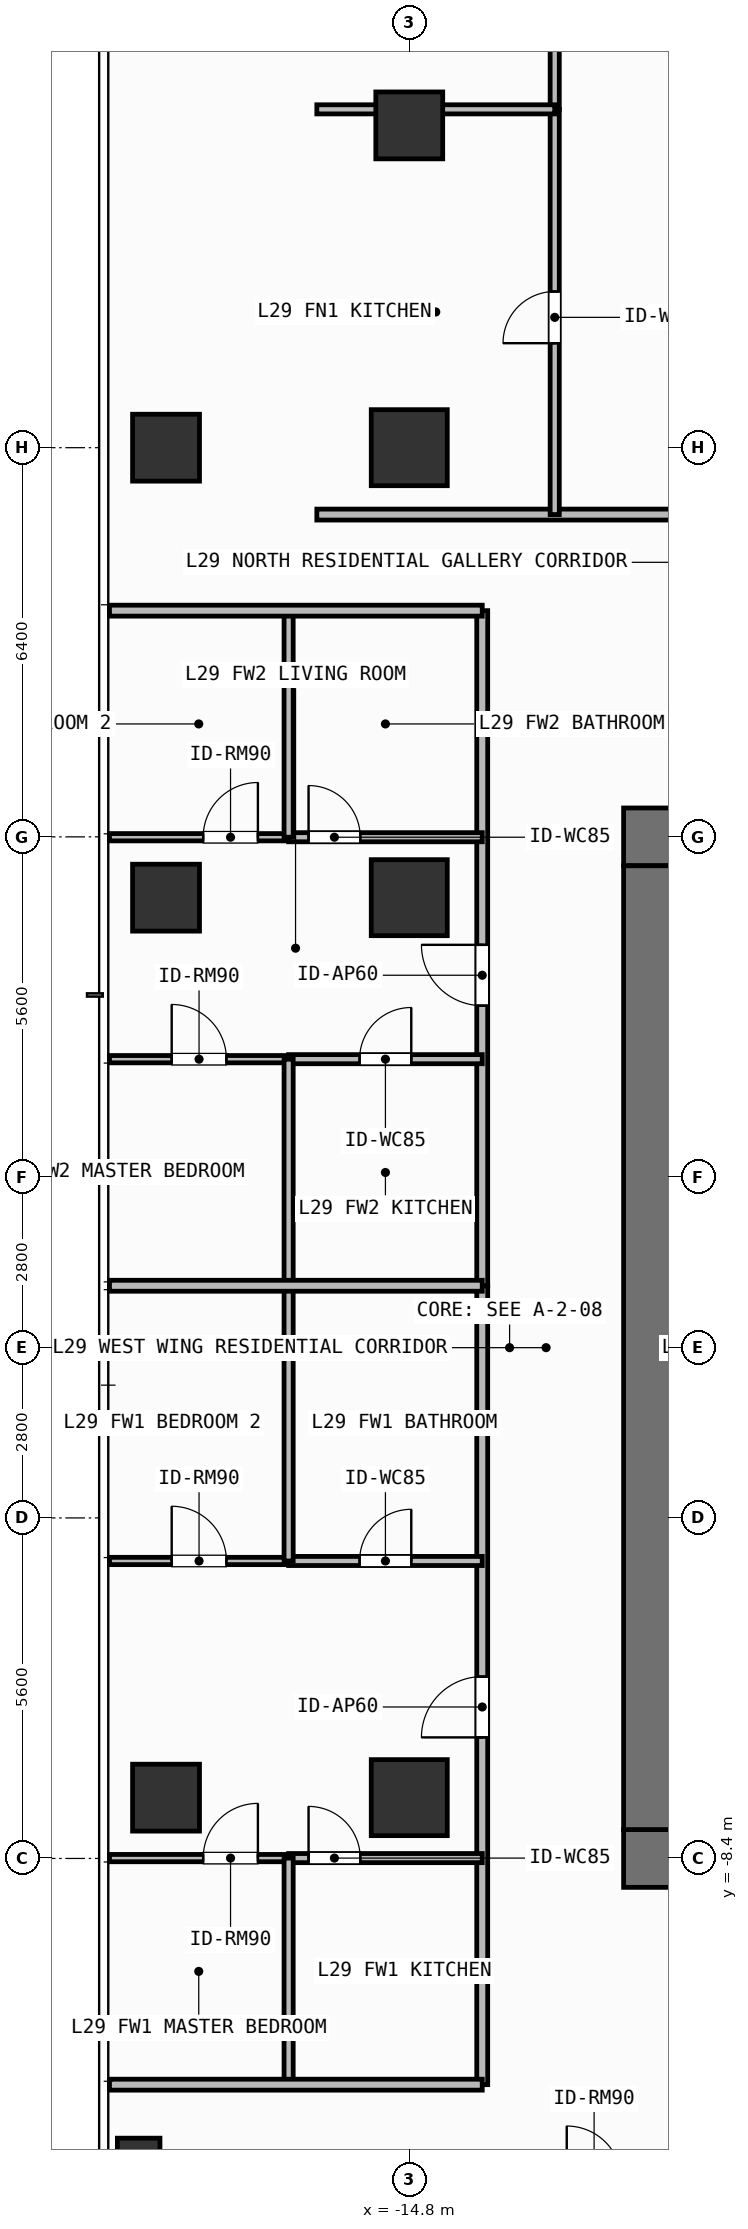
"""IFC4 building model, lengths in metres.
Left out: names, types, materials, properties, quantities, classifications, styles, units other than length and angle.
Written with IfcOpenShell. Run it as: python <this file> out.ifc"""

import sys

from ifc_helpers import new_model, si_unit, direction, frame, frame_2d, origin, origin_2d, place, context, subcontext, project, spatial, rectangle, hollow_rectangle, extrude, element, fill, save


model = new_model("IFC4")
c1 = context("Model", 3, precision=1e-05, world=origin(), true_north=direction((0.0, 1.0)))
c2 = subcontext(c1, "Body", "Model", "MODEL_VIEW")
j1 = project(units=[si_unit("LENGTHUNIT", "METRE"), si_unit("PLANEANGLEUNIT", "RADIAN")], contexts=[c1])
p1 = place(None, origin())
s1 = spatial("IfcSite", under=j1, at=p1, CompositionType="ELEMENT")
p2 = place(p1, origin())
s2 = spatial("IfcBuilding", under=s1, at=p2, CompositionType="ELEMENT")
p3 = place(p2, frame((0.0, 0.0, 117.3)))
s3 = spatial("IfcBuildingStorey", under=s2, at=p3, CompositionType="ELEMENT", Elevation=117.3)
for number, where, z_axis, x_axis in (
    (1, (-11.275, -8.4, 0.0), (0.0, 0.0, 1.0), (1.0, 0.0, 0.0)),
    (2, (-11.275, 8.4, 0.0), (0.0, 0.0, 1.0), (1.0, 0.0, 0.0)),
):
    element("IfcWall", number, at=place(p3, frame(where, z_axis=z_axis, x_axis=x_axis)), inside=s3, PredefinedType="SHEAR", context=c2, shape_type="SweptSolid", body=[
        extrude(rectangle(XDim=1.575, YDim=0.95, at=frame_2d((0.788, 0.0))), origin(), (0.0, 0.0, 1.0), 3.9),
    ])
p4 = place(p3, frame((-10.8, -7.925, 0.0), z_axis=(0.0, 0.0, 1.0), x_axis=(0.0, 1.0, 0.0)))
e3 = element("IfcWall", 3, at=p4, inside=s3, PredefinedType="SHEAR", context=c2, shape_type="SweptSolid", body=[
    extrude(rectangle(XDim=15.85, YDim=0.95, at=frame_2d((7.925, 0.0))), origin(), (0.0, 0.0, 1.0), 3.9),
])
for number, where, z_axis, x_axis in (
    (4, (-14.8, 14.8, 0.0), (0.0, 0.0, 1.0), (1.0, 0.0, 0.0)),
    (5, (-14.8, -7.4, 0.0), (0.0, 0.0, 1.0), (1.0, 0.0, 0.0)),
    (6, (-14.8, 7.4, 0.0), (0.0, 0.0, 1.0), (1.0, 0.0, 0.0)),
):
    element("IfcColumn", number, at=place(p3, frame(where, z_axis=z_axis, x_axis=x_axis)), inside=s3, PredefinedType="COLUMN", context=c2, shape_type="SweptSolid", body=[
        extrude(rectangle(XDim=1.25, YDim=1.25, at=origin_2d()), origin(), (0.0, 0.0, 1.0), 3.9),
    ])
for number, where, z_axis, x_axis in (
    (7, (-18.8, -7.4, 0.0), (0.0, 0.0, 1.0), (1.0, 0.0, 0.0)),
    (8, (-18.8, 7.4, 0.0), (0.0, 0.0, 1.0), (1.0, 0.0, 0.0)),
    (9, (-18.8, 14.8, 0.0), (0.0, 0.0, 1.0), (1.0, 0.0, 0.0)),
    (10, (-14.8, 20.1, 0.0), (0.0, 0.0, 1.0), (1.0, 0.0, 0.0)),
):
    element("IfcColumn", number, at=place(p3, frame(where, z_axis=z_axis, x_axis=x_axis)), inside=s3, PredefinedType="COLUMN", context=c2, shape_type="SweptSolid", body=[
        extrude(rectangle(XDim=1.1, YDim=1.1, at=origin_2d()), origin(), (0.0, 0.0, 1.0), 3.9),
    ])
p5 = place(p3, frame((-19.25, -13.35, 0.0), z_axis=(0.0, 0.0, 1.0), x_axis=(1.0, 0.0, 0.0)))
e11 = element("IfcColumn", 11, at=p5, inside=s3, PredefinedType="COLUMN", context=c2, shape_type="SweptSolid", body=[
    extrude(hollow_rectangle(XDim=0.7, YDim=0.7, WallThickness=0.032, at=origin_2d()), origin(), (0.0, 0.0, 1.0), 3.9),
])
p6 = place(p3, frame((-16.32, 13.7, 0.0), z_axis=(0.0, 0.0, 1.0), x_axis=(1.0, 0.0, 0.0)))
e12 = element("IfcWall", 12, at=p6, inside=s3, PredefinedType="PARTITIONING", context=c2, shape_type="SweptSolid", body=[
    extrude(rectangle(XDim=12.941, YDim=0.18, at=frame_2d((6.471, 0.0))), origin(), (0.0, 0.0, 1.0), 3.68),
])
p7 = place(p6, frame((6.417, 0.0, 0.0)))
e13 = element("IfcOpeningElement", 13, at=p7, cuts=e12, PredefinedType="OPENING", context=c2, shape_type="SweptSolid", body=[
    extrude(rectangle(XDim=1.0, YDim=2.2, at=frame_2d((0.5, 1.1))), frame((0.0, 0.1, 0.0), z_axis=(0.0, -1.0, 0.0), x_axis=(1.0, 0.0, 0.0)), (0.0, 0.0, 1.0), 0.2),
])
p8 = place(p3, frame((-12.408, 13.7, 0.0), z_axis=(0.0, 0.0, 1.0), x_axis=(0.0, 1.0, 0.0)))
e14 = element("IfcWall", 14, at=p8, inside=s3, PredefinedType="PARTITIONING", context=c2, shape_type="SweptSolid", body=[
    extrude(rectangle(XDim=6.664, YDim=0.15, at=frame_2d((3.332, 0.0))), origin(), (0.0, 0.0, 1.0), 3.68),
])
p9 = place(p8, frame((2.818, 0.0, 0.0)))
e15 = element("IfcOpeningElement", 15, at=p9, cuts=e14, PredefinedType="OPENING", context=c2, shape_type="SweptSolid", body=[
    extrude(rectangle(XDim=0.85, YDim=2.1, at=frame_2d((0.425, 1.05))), frame((0.0, 0.085, 0.0), z_axis=(0.0, -1.0, 0.0), x_axis=(1.0, 0.0, 0.0)), (0.0, 0.0, 1.0), 0.17),
])
p10 = place(p3, frame((-12.408, 20.364, 0.0), z_axis=(0.0, 0.0, 1.0), x_axis=(0.0, 1.0, 0.0)))
e16 = element("IfcWall", 16, at=p10, inside=s3, PredefinedType="PARTITIONING", context=c2, shape_type="SweptSolid", body=[
    extrude(rectangle(XDim=4.826, YDim=0.15, at=frame_2d((2.413, 0.0))), origin(), (0.0, 0.0, 1.0), 3.68),
])
p11 = place(p10, frame((1.901, 0.0, 0.0)))
e17 = element("IfcOpeningElement", 17, at=p11, cuts=e16, PredefinedType="OPENING", context=c2, shape_type="SweptSolid", body=[
    extrude(rectangle(XDim=0.85, YDim=2.1, at=frame_2d((0.425, 1.05))), frame((0.0, 0.085, 0.0), z_axis=(0.0, -1.0, 0.0), x_axis=(1.0, 0.0, 0.0)), (0.0, 0.0, 1.0), 0.17),
])
p12 = place(p3, frame((-13.6, -12.12, 0.0), z_axis=(0.0, 0.0, 1.0), x_axis=(0.0, 1.0, 0.0)))
e18 = element("IfcWall", 18, at=p12, inside=s3, PredefinedType="PARTITIONING", context=c2, shape_type="SweptSolid", body=[
    extrude(rectangle(XDim=13.138, YDim=0.18, at=frame_2d((6.569, 0.0))), origin(), (0.0, 0.0, 1.0), 3.68),
])
p13 = place(p12, frame((5.711, 0.0, 0.0)))
e19 = element("IfcOpeningElement", 19, at=p13, cuts=e18, PredefinedType="OPENING", context=c2, shape_type="SweptSolid", body=[
    extrude(rectangle(XDim=1.0, YDim=2.2, at=frame_2d((0.5, 1.1))), frame((0.0, 0.1, 0.0), z_axis=(0.0, -1.0, 0.0), x_axis=(1.0, 0.0, 0.0)), (0.0, 0.0, 1.0), 0.2),
])
p14 = place(p3, frame((-16.784, -3.508, 0.0), z_axis=(0.0, 0.0, 1.0), x_axis=(1.0, 0.0, 0.0)))
e20 = element("IfcWall", 20, at=p14, inside=s3, PredefinedType="PARTITIONING", context=c2, shape_type="SweptSolid", body=[
    extrude(rectangle(XDim=3.184, YDim=0.15, at=frame_2d((1.592, 0.0))), origin(), (0.0, 0.0, 1.0), 3.68),
])
p15 = place(p14, frame((1.167, 0.0, 0.0)))
e21 = element("IfcOpeningElement", 21, at=p15, cuts=e20, PredefinedType="OPENING", context=c2, shape_type="SweptSolid", body=[
    extrude(rectangle(XDim=0.85, YDim=2.1, at=frame_2d((0.425, 1.05))), frame((0.0, 0.085, 0.0), z_axis=(0.0, -1.0, 0.0), x_axis=(1.0, 0.0, 0.0)), (0.0, 0.0, 1.0), 0.17),
])
p16 = place(p3, frame((-16.784, -8.394, 0.0), z_axis=(0.0, 0.0, 1.0), x_axis=(1.0, 0.0, 0.0)))
e22 = element("IfcWall", 22, at=p16, inside=s3, PredefinedType="PARTITIONING", context=c2, shape_type="SweptSolid", body=[
    extrude(rectangle(XDim=3.184, YDim=0.15, at=frame_2d((1.592, 0.0))), origin(), (0.0, 0.0, 1.0), 3.68),
])
p17 = place(p16, frame((0.328, 0.0, 0.0)))
e23 = element("IfcOpeningElement", 23, at=p17, cuts=e22, PredefinedType="OPENING", context=c2, shape_type="SweptSolid", body=[
    extrude(rectangle(XDim=0.85, YDim=2.1, at=frame_2d((0.425, 1.05))), frame((0.0, 0.085, 0.0), z_axis=(0.0, -1.0, 0.0), x_axis=(1.0, 0.0, 0.0)), (0.0, 0.0, 1.0), 0.17),
])
p18 = place(p3, frame((-19.73, -8.394, 0.0), z_axis=(0.0, 0.0, 1.0), x_axis=(1.0, 0.0, 0.0)))
e24 = element("IfcWall", 24, at=p18, inside=s3, PredefinedType="PARTITIONING", context=c2, shape_type="SweptSolid", body=[
    extrude(rectangle(XDim=2.946, YDim=0.12, at=frame_2d((1.473, 0.0))), origin(), (0.0, 0.0, 1.0), 3.68),
])
p19 = place(p18, frame((1.541, 0.0, 0.0)))
e25 = element("IfcOpeningElement", 25, at=p19, cuts=e24, PredefinedType="OPENING", context=c2, shape_type="SweptSolid", body=[
    extrude(rectangle(XDim=0.9, YDim=2.1, at=frame_2d((0.45, 1.05))), frame((0.0, 0.07, 0.0), z_axis=(0.0, -1.0, 0.0), x_axis=(1.0, 0.0, 0.0)), (0.0, 0.0, 1.0), 0.14),
])
p20 = place(p3, frame((-19.73, -3.508, 0.0), z_axis=(0.0, 0.0, 1.0), x_axis=(1.0, 0.0, 0.0)))
e26 = element("IfcWall", 26, at=p20, inside=s3, PredefinedType="PARTITIONING", context=c2, shape_type="SweptSolid", body=[
    extrude(rectangle(XDim=2.946, YDim=0.12, at=frame_2d((1.473, 0.0))), origin(), (0.0, 0.0, 1.0), 3.68),
])
p21 = place(p20, frame((1.023, 0.0, 0.0)))
e27 = element("IfcOpeningElement", 27, at=p21, cuts=e26, PredefinedType="OPENING", context=c2, shape_type="SweptSolid", body=[
    extrude(rectangle(XDim=0.9, YDim=2.1, at=frame_2d((0.45, 1.05))), frame((0.0, 0.07, 0.0), z_axis=(0.0, -1.0, 0.0), x_axis=(1.0, 0.0, 0.0)), (0.0, 0.0, 1.0), 0.14),
])
p22 = place(p3, frame((-13.6, 1.018, 0.0), z_axis=(0.0, 0.0, 1.0), x_axis=(0.0, 1.0, 0.0)))
e28 = element("IfcWall", 28, at=p22, inside=s3, PredefinedType="PARTITIONING", context=c2, shape_type="SweptSolid", body=[
    extrude(rectangle(XDim=11.102, YDim=0.18, at=frame_2d((5.551, 0.0))), origin(), (0.0, 0.0, 1.0), 3.68),
])
p23 = place(p22, frame((4.606, 0.0, 0.0)))
e29 = element("IfcOpeningElement", 29, at=p23, cuts=e28, PredefinedType="OPENING", context=c2, shape_type="SweptSolid", body=[
    extrude(rectangle(XDim=1.0, YDim=2.2, at=frame_2d((0.5, 1.1))), frame((0.0, 0.1, 0.0), z_axis=(0.0, -1.0, 0.0), x_axis=(1.0, 0.0, 0.0)), (0.0, 0.0, 1.0), 0.2),
])
p24 = place(p3, frame((-16.784, 8.394, 0.0), z_axis=(0.0, 0.0, 1.0), x_axis=(1.0, 0.0, 0.0)))
e30 = element("IfcWall", 30, at=p24, inside=s3, PredefinedType="PARTITIONING", context=c2, shape_type="SweptSolid", body=[
    extrude(rectangle(XDim=3.184, YDim=0.15, at=frame_2d((1.592, 0.0))), origin(), (0.0, 0.0, 1.0), 3.68),
])
p25 = place(p24, frame((0.328, 0.0, 0.0)))
e31 = element("IfcOpeningElement", 31, at=p25, cuts=e30, PredefinedType="OPENING", context=c2, shape_type="SweptSolid", body=[
    extrude(rectangle(XDim=0.85, YDim=2.1, at=frame_2d((0.425, 1.05))), frame((0.0, 0.085, 0.0), z_axis=(0.0, -1.0, 0.0), x_axis=(1.0, 0.0, 0.0)), (0.0, 0.0, 1.0), 0.17),
])
p26 = place(p3, frame((-16.784, 4.744, 0.0), z_axis=(0.0, 0.0, 1.0), x_axis=(1.0, 0.0, 0.0)))
e32 = element("IfcWall", 32, at=p26, inside=s3, PredefinedType="PARTITIONING", context=c2, shape_type="SweptSolid", body=[
    extrude(rectangle(XDim=3.184, YDim=0.15, at=frame_2d((1.592, 0.0))), origin(), (0.0, 0.0, 1.0), 3.68),
])
p27 = place(p26, frame((1.167, 0.0, 0.0)))
e33 = element("IfcOpeningElement", 33, at=p27, cuts=e32, PredefinedType="OPENING", context=c2, shape_type="SweptSolid", body=[
    extrude(rectangle(XDim=0.85, YDim=2.1, at=frame_2d((0.425, 1.05))), frame((0.0, 0.085, 0.0), z_axis=(0.0, -1.0, 0.0), x_axis=(1.0, 0.0, 0.0)), (0.0, 0.0, 1.0), 0.17),
])
p28 = place(p3, frame((-19.73, 4.744, 0.0), z_axis=(0.0, 0.0, 1.0), x_axis=(1.0, 0.0, 0.0)))
e34 = element("IfcWall", 34, at=p28, inside=s3, PredefinedType="PARTITIONING", context=c2, shape_type="SweptSolid", body=[
    extrude(rectangle(XDim=2.946, YDim=0.12, at=frame_2d((1.473, 0.0))), origin(), (0.0, 0.0, 1.0), 3.68),
])
p29 = place(p28, frame((1.023, 0.0, 0.0)))
e35 = element("IfcOpeningElement", 35, at=p29, cuts=e34, PredefinedType="OPENING", context=c2, shape_type="SweptSolid", body=[
    extrude(rectangle(XDim=0.9, YDim=2.1, at=frame_2d((0.45, 1.05))), frame((0.0, 0.07, 0.0), z_axis=(0.0, -1.0, 0.0), x_axis=(1.0, 0.0, 0.0)), (0.0, 0.0, 1.0), 0.14),
])
p30 = place(p3, frame((-19.73, 8.394, 0.0), z_axis=(0.0, 0.0, 1.0), x_axis=(1.0, 0.0, 0.0)))
e36 = element("IfcWall", 36, at=p30, inside=s3, PredefinedType="PARTITIONING", context=c2, shape_type="SweptSolid", body=[
    extrude(rectangle(XDim=2.946, YDim=0.12, at=frame_2d((1.473, 0.0))), origin(), (0.0, 0.0, 1.0), 3.68),
])
p31 = place(p30, frame((1.541, 0.0, 0.0)))
e37 = element("IfcOpeningElement", 37, at=p31, cuts=e36, PredefinedType="OPENING", context=c2, shape_type="SweptSolid", body=[
    extrude(rectangle(XDim=0.9, YDim=2.1, at=frame_2d((0.45, 1.05))), frame((0.0, 0.07, 0.0), z_axis=(0.0, -1.0, 0.0), x_axis=(1.0, 0.0, 0.0)), (0.0, 0.0, 1.0), 0.14),
])
p32 = place(p3, frame((-16.32, 20.364, 0.0), z_axis=(0.0, 0.0, 1.0), x_axis=(1.0, 0.0, 0.0)))
e38 = element("IfcWall", 38, at=p32, inside=s3, PredefinedType="PARTITIONING", context=c2, shape_type="SweptSolid", body=[
    extrude(rectangle(XDim=3.912, YDim=0.15, at=frame_2d((1.956, 0.0))), origin(), (0.0, 0.0, 1.0), 3.082),
])
p33 = place(p3, frame((-16.784, -12.12, 0.0), z_axis=(0.0, 0.0, 1.0), x_axis=(0.0, 1.0, 0.0)))
e39 = element("IfcWall", 39, at=p33, inside=s3, PredefinedType="PARTITIONING", context=c2, shape_type="SweptSolid", body=[
    extrude(rectangle(XDim=3.726, YDim=0.15, at=frame_2d((1.863, 0.0))), origin(), (0.0, 0.0, 1.0), 3.68),
])
p34 = place(p3, frame((-16.784, -3.508, 0.0), z_axis=(0.0, 0.0, 1.0), x_axis=(0.0, 1.0, 0.0)))
e40 = element("IfcWall", 40, at=p34, inside=s3, PredefinedType="PARTITIONING", context=c2, shape_type="SweptSolid", body=[
    extrude(rectangle(XDim=4.526, YDim=0.15, at=frame_2d((2.263, 0.0))), origin(), (0.0, 0.0, 1.0), 3.68),
])
p35 = place(p3, frame((-16.784, 1.018, 0.0), z_axis=(0.0, 0.0, 1.0), x_axis=(0.0, 1.0, 0.0)))
e41 = element("IfcWall", 41, at=p35, inside=s3, PredefinedType="PARTITIONING", context=c2, shape_type="SweptSolid", body=[
    extrude(rectangle(XDim=3.726, YDim=0.15, at=frame_2d((1.863, 0.0))), origin(), (0.0, 0.0, 1.0), 3.68),
])
p36 = place(p3, frame((-16.784, 8.394, 0.0), z_axis=(0.0, 0.0, 1.0), x_axis=(0.0, 1.0, 0.0)))
e42 = element("IfcWall", 42, at=p36, inside=s3, PredefinedType="PARTITIONING", context=c2, shape_type="SweptSolid", body=[
    extrude(rectangle(XDim=3.726, YDim=0.15, at=frame_2d((1.863, 0.0))), origin(), (0.0, 0.0, 1.0), 3.68),
])
for number, where, z_axis, x_axis in (
    (43, (-19.73, 1.018, 0.0), (0.0, 0.0, 1.0), (1.0, 0.0, 0.0)),
    (44, (-19.73, -12.12, 0.0), (0.0, 0.0, 1.0), (1.0, 0.0, 0.0)),
    (45, (-19.73, 12.12, 0.0), (0.0, 0.0, 1.0), (1.0, 0.0, 0.0)),
):
    element("IfcWall", number, at=place(p3, frame(where, z_axis=z_axis, x_axis=x_axis)), inside=s3, PredefinedType="PARTITIONING", context=c2, shape_type="SweptSolid", body=[
        extrude(rectangle(XDim=6.13, YDim=0.18, at=frame_2d((3.065, 0.0))), origin(), (0.0, 0.0, 1.0), 3.68),
    ])
p37 = place(p9, origin())
e46 = element("IfcDoor", 46, at=p37, inside=s3, OperationType="SINGLE_SWING_LEFT", PredefinedType="DOOR", context=c2, shape_type="SweptSolid", body=[
    extrude(rectangle(XDim=0.85, YDim=2.1, at=frame_2d((0.425, 1.05))), frame((0.0, 0.025, 0.0), z_axis=(0.0, -1.0, 0.0), x_axis=(1.0, 0.0, 0.0)), (0.0, 0.0, 1.0), 0.05),
])
fill(e15, e46)
p38 = place(p13, origin())
e47 = element("IfcDoor", 47, at=p38, inside=s3, OperationType="SINGLE_SWING_LEFT", PredefinedType="DOOR", context=c2, shape_type="SweptSolid", body=[
    extrude(rectangle(XDim=1.0, YDim=2.2, at=frame_2d((0.5, 1.1))), frame((0.0, 0.025, 0.0), z_axis=(0.0, -1.0, 0.0), x_axis=(1.0, 0.0, 0.0)), (0.0, 0.0, 1.0), 0.05),
])
fill(e19, e47)
p39 = place(p15, origin())
e48 = element("IfcDoor", 48, at=p39, inside=s3, OperationType="SINGLE_SWING_RIGHT", PredefinedType="DOOR", context=c2, shape_type="SweptSolid", body=[
    extrude(rectangle(XDim=0.85, YDim=2.1, at=frame_2d((0.425, 1.05))), frame((0.0, 0.025, 0.0), z_axis=(0.0, -1.0, 0.0), x_axis=(1.0, 0.0, 0.0)), (0.0, 0.0, 1.0), 0.05),
])
fill(e21, e48)
p40 = place(p17, origin())
e49 = element("IfcDoor", 49, at=p40, inside=s3, OperationType="SINGLE_SWING_LEFT", PredefinedType="DOOR", context=c2, shape_type="SweptSolid", body=[
    extrude(rectangle(XDim=0.85, YDim=2.1, at=frame_2d((0.425, 1.05))), frame((0.0, 0.025, 0.0), z_axis=(0.0, -1.0, 0.0), x_axis=(1.0, 0.0, 0.0)), (0.0, 0.0, 1.0), 0.05),
])
fill(e23, e49)
p41 = place(p19, origin())
e50 = element("IfcDoor", 50, at=p41, inside=s3, OperationType="SINGLE_SWING_RIGHT", PredefinedType="DOOR", context=c2, shape_type="SweptSolid", body=[
    extrude(rectangle(XDim=0.9, YDim=2.1, at=frame_2d((0.45, 1.05))), frame((0.0, 0.025, 0.0), z_axis=(0.0, -1.0, 0.0), x_axis=(1.0, 0.0, 0.0)), (0.0, 0.0, 1.0), 0.05),
])
fill(e25, e50)
p42 = place(p21, origin())
e51 = element("IfcDoor", 51, at=p42, inside=s3, OperationType="SINGLE_SWING_LEFT", PredefinedType="DOOR", context=c2, shape_type="SweptSolid", body=[
    extrude(rectangle(XDim=0.9, YDim=2.1, at=frame_2d((0.45, 1.05))), frame((0.0, 0.025, 0.0), z_axis=(0.0, -1.0, 0.0), x_axis=(1.0, 0.0, 0.0)), (0.0, 0.0, 1.0), 0.05),
])
fill(e27, e51)
p43 = place(p23, origin())
e52 = element("IfcDoor", 52, at=p43, inside=s3, OperationType="SINGLE_SWING_RIGHT", PredefinedType="DOOR", context=c2, shape_type="SweptSolid", body=[
    extrude(rectangle(XDim=1.0, YDim=2.2, at=frame_2d((0.5, 1.1))), frame((0.0, 0.025, 0.0), z_axis=(0.0, -1.0, 0.0), x_axis=(1.0, 0.0, 0.0)), (0.0, 0.0, 1.0), 0.05),
])
fill(e29, e52)
p44 = place(p25, origin())
e53 = element("IfcDoor", 53, at=p44, inside=s3, OperationType="SINGLE_SWING_LEFT", PredefinedType="DOOR", context=c2, shape_type="SweptSolid", body=[
    extrude(rectangle(XDim=0.85, YDim=2.1, at=frame_2d((0.425, 1.05))), frame((0.0, 0.025, 0.0), z_axis=(0.0, -1.0, 0.0), x_axis=(1.0, 0.0, 0.0)), (0.0, 0.0, 1.0), 0.05),
])
fill(e31, e53)
p45 = place(p27, origin())
e54 = element("IfcDoor", 54, at=p45, inside=s3, OperationType="SINGLE_SWING_RIGHT", PredefinedType="DOOR", context=c2, shape_type="SweptSolid", body=[
    extrude(rectangle(XDim=0.85, YDim=2.1, at=frame_2d((0.425, 1.05))), frame((0.0, 0.025, 0.0), z_axis=(0.0, -1.0, 0.0), x_axis=(1.0, 0.0, 0.0)), (0.0, 0.0, 1.0), 0.05),
])
fill(e33, e54)
p46 = place(p29, origin())
e55 = element("IfcDoor", 55, at=p46, inside=s3, OperationType="SINGLE_SWING_LEFT", PredefinedType="DOOR", context=c2, shape_type="SweptSolid", body=[
    extrude(rectangle(XDim=0.9, YDim=2.1, at=frame_2d((0.45, 1.05))), frame((0.0, 0.025, 0.0), z_axis=(0.0, -1.0, 0.0), x_axis=(1.0, 0.0, 0.0)), (0.0, 0.0, 1.0), 0.05),
])
fill(e35, e55)
p47 = place(p31, origin())
e56 = element("IfcDoor", 56, at=p47, inside=s3, OperationType="SINGLE_SWING_RIGHT", PredefinedType="DOOR", context=c2, shape_type="SweptSolid", body=[
    extrude(rectangle(XDim=0.9, YDim=2.1, at=frame_2d((0.45, 1.05))), frame((0.0, 0.025, 0.0), z_axis=(0.0, -1.0, 0.0), x_axis=(1.0, 0.0, 0.0)), (0.0, 0.0, 1.0), 0.05),
])
fill(e37, e56)
save(model, sys.argv[1])
